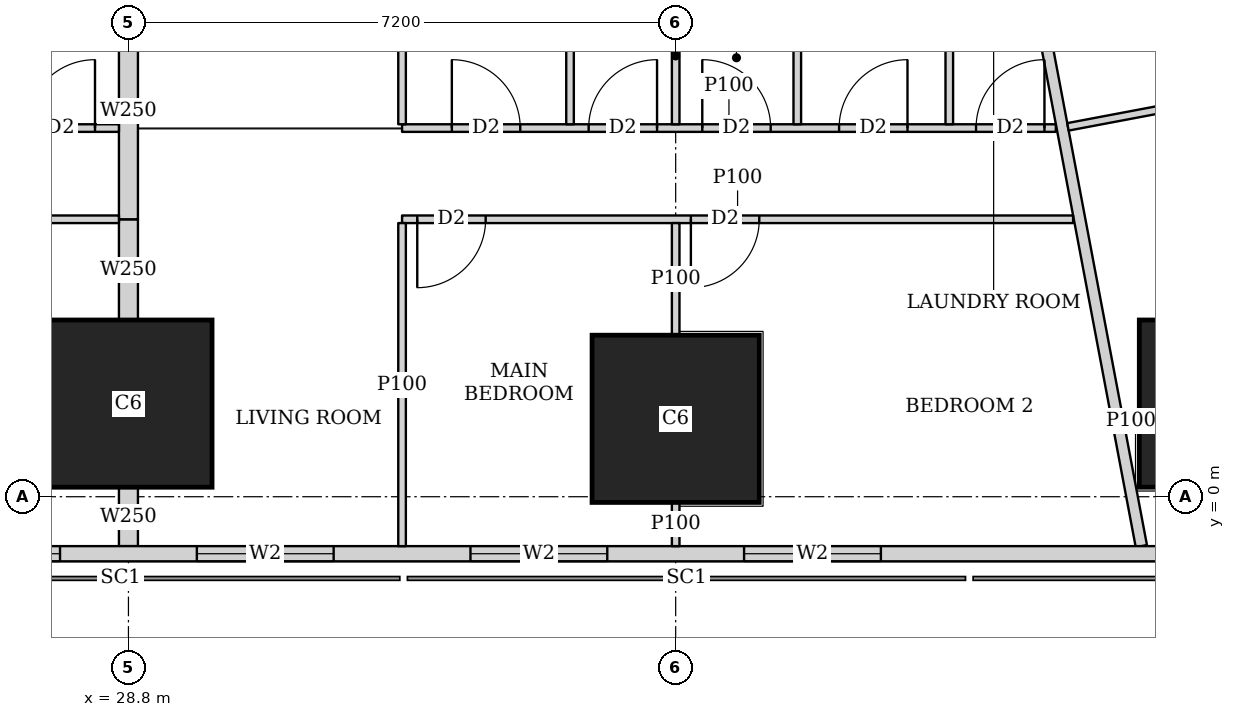
"""IFC4 building model, lengths in metres.
Left out: names, types, materials, properties, quantities, classifications, styles, units other than length and angle.
Written with IfcOpenShell. Run it as: python <this file> out.ifc"""

import sys

from ifc_helpers import new_model, si_unit, direction, frame, frame_2d, origin, origin_2d, place, context, subcontext, project, spatial, rectangle, extrude, element, fill, save


model = new_model("IFC4")
c1 = context("Model", 3, precision=1e-05, world=origin(), true_north=direction((0.0, 1.0)))
c2 = subcontext(c1, "Body", "Model", "MODEL_VIEW")
j1 = project(units=[si_unit("LENGTHUNIT", "METRE"), si_unit("PLANEANGLEUNIT", "RADIAN")], contexts=[c1])
p1 = place(None, origin())
s1 = spatial("IfcSite", under=j1, at=p1, CompositionType="ELEMENT")
p2 = place(p1, origin())
s2 = spatial("IfcBuilding", under=s1, at=p2, CompositionType="ELEMENT")
p3 = place(p2, frame((0.0, 0.0, 77.9)))
s3 = spatial("IfcBuildingStorey", under=s2, at=p3, CompositionType="ELEMENT", Elevation=77.9)
for number, where, z_axis, x_axis in (
    (1, (28.8, 1.225, 0.0), (0.0, 0.0, 1.0), (1.0, 0.0, 0.0)),
    (2, (36.0, 1.025, 0.0), (0.0, 0.0, 1.0), (1.0, 0.0, 0.0)),
    (3, (43.2, 1.225, 0.0), (0.0, 0.0, 1.0), (1.0, 0.0, 0.0)),
):
    element("IfcColumn", number, at=place(p3, frame(where, z_axis=z_axis, x_axis=x_axis)), inside=s3, PredefinedType="COLUMN", context=c2, shape_type="SweptSolid", body=[
        extrude(rectangle(XDim=2.2, YDim=2.2, at=origin_2d()), origin(), (0.0, 0.0, 1.0), 3.75),
    ])
p4 = place(p3, frame((2.163, -0.75, 0.0), z_axis=(0.0, 0.0, 1.0), x_axis=(1.0, 0.0, 0.0)))
e4 = element("IfcWall", 4, at=p4, inside=s3, PredefinedType="SOLIDWALL", context=c2, shape_type="SweptSolid", body=[
    extrude(rectangle(XDim=45.628, YDim=0.2, at=frame_2d((22.814, 0.0))), origin(), (0.0, 0.0, 1.0), 3.5),
])
p5 = place(p4, frame((9.537, 0.0, 0.9)))
e5 = element("IfcOpeningElement", 5, at=p5, cuts=e4, PredefinedType="OPENING", context=c2, shape_type="SweptSolid", body=[
    extrude(rectangle(XDim=1.8, YDim=1.5, at=frame_2d((0.9, 0.75))), frame((0.0, 0.11, 0.0), z_axis=(0.0, -1.0, 0.0), x_axis=(1.0, 0.0, 0.0)), (0.0, 0.0, 1.0), 0.22),
])
p6 = place(p4, frame((13.137, 0.0, 0.9)))
e6 = element("IfcOpeningElement", 6, at=p6, cuts=e4, PredefinedType="OPENING", context=c2, shape_type="SweptSolid", body=[
    extrude(rectangle(XDim=1.8, YDim=1.5, at=frame_2d((0.9, 0.75))), frame((0.0, 0.11, 0.0), z_axis=(0.0, -1.0, 0.0), x_axis=(1.0, 0.0, 0.0)), (0.0, 0.0, 1.0), 0.22),
])
p7 = place(p4, frame((16.737, 0.0, 0.9)))
e7 = element("IfcOpeningElement", 7, at=p7, cuts=e4, PredefinedType="OPENING", context=c2, shape_type="SweptSolid", body=[
    extrude(rectangle(XDim=1.8, YDim=1.5, at=frame_2d((0.9, 0.75))), frame((0.0, 0.11, 0.0), z_axis=(0.0, -1.0, 0.0), x_axis=(1.0, 0.0, 0.0)), (0.0, 0.0, 1.0), 0.22),
])
p8 = place(p4, frame((20.337, 0.0, 0.9)))
e8 = element("IfcOpeningElement", 8, at=p8, cuts=e4, PredefinedType="OPENING", context=c2, shape_type="SweptSolid", body=[
    extrude(rectangle(XDim=1.8, YDim=1.5, at=frame_2d((0.9, 0.75))), frame((0.0, 0.11, 0.0), z_axis=(0.0, -1.0, 0.0), x_axis=(1.0, 0.0, 0.0)), (0.0, 0.0, 1.0), 0.22),
])
p9 = place(p4, frame((23.937, 0.0, 0.9)))
e9 = element("IfcOpeningElement", 9, at=p9, cuts=e4, PredefinedType="OPENING", context=c2, shape_type="SweptSolid", body=[
    extrude(rectangle(XDim=1.8, YDim=1.5, at=frame_2d((0.9, 0.75))), frame((0.0, 0.11, 0.0), z_axis=(0.0, -1.0, 0.0), x_axis=(1.0, 0.0, 0.0)), (0.0, 0.0, 1.0), 0.22),
])
p10 = place(p4, frame((27.537, 0.0, 0.9)))
e10 = element("IfcOpeningElement", 10, at=p10, cuts=e4, PredefinedType="OPENING", context=c2, shape_type="SweptSolid", body=[
    extrude(rectangle(XDim=1.8, YDim=1.5, at=frame_2d((0.9, 0.75))), frame((0.0, 0.11, 0.0), z_axis=(0.0, -1.0, 0.0), x_axis=(1.0, 0.0, 0.0)), (0.0, 0.0, 1.0), 0.22),
])
p11 = place(p4, frame((31.137, 0.0, 0.9)))
e11 = element("IfcOpeningElement", 11, at=p11, cuts=e4, PredefinedType="OPENING", context=c2, shape_type="SweptSolid", body=[
    extrude(rectangle(XDim=1.8, YDim=1.5, at=frame_2d((0.9, 0.75))), frame((0.0, 0.11, 0.0), z_axis=(0.0, -1.0, 0.0), x_axis=(1.0, 0.0, 0.0)), (0.0, 0.0, 1.0), 0.22),
])
p12 = place(p4, frame((34.737, 0.0, 0.9)))
e12 = element("IfcOpeningElement", 12, at=p12, cuts=e4, PredefinedType="OPENING", context=c2, shape_type="SweptSolid", body=[
    extrude(rectangle(XDim=1.8, YDim=1.5, at=frame_2d((0.9, 0.75))), frame((0.0, 0.11, 0.0), z_axis=(0.0, -1.0, 0.0), x_axis=(1.0, 0.0, 0.0)), (0.0, 0.0, 1.0), 0.22),
])
p13 = place(p3, frame((33.382, 45.65, 0.0), z_axis=(0.0, 0.0, 1.0), x_axis=(0.185593544777, -0.982626600565, 0.0)))
e13 = element("IfcWall", 13, at=p13, inside=s3, PredefinedType="SOLIDWALL", context=c2, shape_type="SweptSolid", body=[
    extrude(rectangle(XDim=47.118, YDim=0.15, at=frame_2d((23.559, 0.0))), origin(), (0.0, 0.0, 1.0), 2.2),
])
p14 = place(p13, frame((19.054, 0.0, 0.0)))
e14 = element("IfcOpeningElement", 14, at=p14, cuts=e13, PredefinedType="OPENING", context=c2, shape_type="SweptSolid", body=[
    extrude(rectangle(XDim=1.0, YDim=2.1, at=frame_2d((0.5, 1.05))), frame((0.0, 0.085, 0.0), z_axis=(0.0, -1.0, 0.0), x_axis=(1.0, 0.0, 0.0)), (0.0, 0.0, 1.0), 0.17),
])
p15 = place(p13, frame((22.87, 0.0, 0.0)))
e15 = element("IfcOpeningElement", 15, at=p15, cuts=e13, PredefinedType="OPENING", context=c2, shape_type="SweptSolid", body=[
    extrude(rectangle(XDim=1.0, YDim=2.1, at=frame_2d((0.5, 1.05))), frame((0.0, 0.085, 0.0), z_axis=(0.0, -1.0, 0.0), x_axis=(1.0, 0.0, 0.0)), (0.0, 0.0, 1.0), 0.17),
])
p16 = place(p13, frame((33.833, 0.0, 0.0)))
e16 = element("IfcOpeningElement", 16, at=p16, cuts=e13, PredefinedType="OPENING", context=c2, shape_type="SweptSolid", body=[
    extrude(rectangle(XDim=1.0, YDim=2.1, at=frame_2d((0.5, 1.05))), frame((0.0, 0.085, 0.0), z_axis=(0.0, -1.0, 0.0), x_axis=(1.0, 0.0, 0.0)), (0.0, 0.0, 1.0), 0.17),
])
p17 = place(p3, frame((28.675, 3.65, 0.0), z_axis=(0.0, 0.0, 1.0), x_axis=(-1.0, 0.0, 0.0)))
e17 = element("IfcWall", 17, at=p17, inside=s3, PredefinedType="PARTITIONING", context=c2, shape_type="SweptSolid", body=[
    extrude(rectangle(XDim=10.675, YDim=0.1, at=frame_2d((5.337, 0.0))), origin(), (0.0, 0.0, 1.0), 3.5),
])
p18 = place(p17, frame((9.575, 0.0, 0.0)))
e18 = element("IfcOpeningElement", 18, at=p18, cuts=e17, PredefinedType="OPENING", context=c2, shape_type="SweptSolid", body=[
    extrude(rectangle(XDim=0.9, YDim=2.1, at=frame_2d((0.45, 1.05))), frame((0.0, 0.06, 0.0), z_axis=(0.0, -1.0, 0.0), x_axis=(1.0, 0.0, 0.0)), (0.0, 0.0, 1.0), 0.12),
])
p19 = place(p17, frame((5.975, 0.0, 0.0)))
e19 = element("IfcOpeningElement", 19, at=p19, cuts=e17, PredefinedType="OPENING", context=c2, shape_type="SweptSolid", body=[
    extrude(rectangle(XDim=0.9, YDim=2.1, at=frame_2d((0.45, 1.05))), frame((0.0, 0.06, 0.0), z_axis=(0.0, -1.0, 0.0), x_axis=(1.0, 0.0, 0.0)), (0.0, 0.0, 1.0), 0.12),
])
p20 = place(p17, frame((2.375, 0.0, 0.0)))
e20 = element("IfcOpeningElement", 20, at=p20, cuts=e17, PredefinedType="OPENING", context=c2, shape_type="SweptSolid", body=[
    extrude(rectangle(XDim=0.9, YDim=2.1, at=frame_2d((0.45, 1.05))), frame((0.0, 0.06, 0.0), z_axis=(0.0, -1.0, 0.0), x_axis=(1.0, 0.0, 0.0)), (0.0, 0.0, 1.0), 0.12),
])
p21 = place(p3, frame((28.675, 4.85, 0.0), z_axis=(0.0, 0.0, 1.0), x_axis=(-1.0, 0.0, 0.0)))
e21 = element("IfcWall", 21, at=p21, inside=s3, PredefinedType="PARTITIONING", context=c2, shape_type="SweptSolid", body=[
    extrude(rectangle(XDim=10.675, YDim=0.1, at=frame_2d((5.337, 0.0))), origin(), (0.0, 0.0, 1.0), 3.5),
])
p22 = place(p21, frame((9.12, 0.0, 0.0)))
e22 = element("IfcOpeningElement", 22, at=p22, cuts=e21, PredefinedType="OPENING", context=c2, shape_type="SweptSolid", body=[
    extrude(rectangle(XDim=0.9, YDim=2.1, at=frame_2d((0.45, 1.05))), frame((0.0, 0.06, 0.0), z_axis=(0.0, -1.0, 0.0), x_axis=(1.0, 0.0, 0.0)), (0.0, 0.0, 1.0), 0.12),
])
p23 = place(p21, frame((5.825, 0.0, 0.0)))
e23 = element("IfcOpeningElement", 23, at=p23, cuts=e21, PredefinedType="OPENING", context=c2, shape_type="SweptSolid", body=[
    extrude(rectangle(XDim=0.9, YDim=2.1, at=frame_2d((0.45, 1.05))), frame((0.0, 0.06, 0.0), z_axis=(0.0, -1.0, 0.0), x_axis=(1.0, 0.0, 0.0)), (0.0, 0.0, 1.0), 0.12),
])
p24 = place(p21, frame((2.115, 0.0, 0.0)))
e24 = element("IfcOpeningElement", 24, at=p24, cuts=e21, PredefinedType="OPENING", context=c2, shape_type="SweptSolid", body=[
    extrude(rectangle(XDim=0.9, YDim=2.1, at=frame_2d((0.45, 1.05))), frame((0.0, 0.06, 0.0), z_axis=(0.0, -1.0, 0.0), x_axis=(1.0, 0.0, 0.0)), (0.0, 0.0, 1.0), 0.12),
])
p25 = place(p21, frame((7.32, 0.0, 0.0)))
e25 = element("IfcOpeningElement", 25, at=p25, cuts=e21, PredefinedType="OPENING", context=c2, shape_type="SweptSolid", body=[
    extrude(rectangle(XDim=0.9, YDim=2.1, at=frame_2d((0.45, 1.05))), frame((0.0, 0.06, 0.0), z_axis=(0.0, -1.0, 0.0), x_axis=(1.0, 0.0, 0.0)), (0.0, 0.0, 1.0), 0.12),
])
p26 = place(p21, frame((4.025, 0.0, 0.0)))
e26 = element("IfcOpeningElement", 26, at=p26, cuts=e21, PredefinedType="OPENING", context=c2, shape_type="SweptSolid", body=[
    extrude(rectangle(XDim=0.9, YDim=2.1, at=frame_2d((0.45, 1.05))), frame((0.0, 0.06, 0.0), z_axis=(0.0, -1.0, 0.0), x_axis=(1.0, 0.0, 0.0)), (0.0, 0.0, 1.0), 0.12),
])
p27 = place(p21, frame((0.315, 0.0, 0.0)))
e27 = element("IfcOpeningElement", 27, at=p27, cuts=e21, PredefinedType="OPENING", context=c2, shape_type="SweptSolid", body=[
    extrude(rectangle(XDim=0.9, YDim=2.1, at=frame_2d((0.45, 1.05))), frame((0.0, 0.06, 0.0), z_axis=(0.0, -1.0, 0.0), x_axis=(1.0, 0.0, 0.0)), (0.0, 0.0, 1.0), 0.12),
])
p28 = place(p3, frame((41.229, 3.65, 0.0), z_axis=(0.0, 0.0, 1.0), x_axis=(-1.0, 0.0, 0.0)))
e28 = element("IfcWall", 28, at=p28, inside=s3, PredefinedType="PARTITIONING", context=c2, shape_type="SweptSolid", body=[
    extrude(rectangle(XDim=8.829, YDim=0.1, at=frame_2d((4.415, 0.0))), origin(), (0.0, 0.0, 1.0), 3.5),
])
p29 = place(p28, frame((7.729, 0.0, 0.0)))
e29 = element("IfcOpeningElement", 29, at=p29, cuts=e28, PredefinedType="OPENING", context=c2, shape_type="SweptSolid", body=[
    extrude(rectangle(XDim=0.9, YDim=2.1, at=frame_2d((0.45, 1.05))), frame((0.0, 0.06, 0.0), z_axis=(0.0, -1.0, 0.0), x_axis=(1.0, 0.0, 0.0)), (0.0, 0.0, 1.0), 0.12),
])
p30 = place(p28, frame((4.129, 0.0, 0.0)))
e30 = element("IfcOpeningElement", 30, at=p30, cuts=e28, PredefinedType="OPENING", context=c2, shape_type="SweptSolid", body=[
    extrude(rectangle(XDim=0.9, YDim=2.1, at=frame_2d((0.45, 1.05))), frame((0.0, 0.06, 0.0), z_axis=(0.0, -1.0, 0.0), x_axis=(1.0, 0.0, 0.0)), (0.0, 0.0, 1.0), 0.12),
])
p31 = place(p3, frame((41.002, 4.85, 0.0), z_axis=(0.0, 0.0, 1.0), x_axis=(-1.0, 0.0, 0.0)))
e31 = element("IfcWall", 31, at=p31, inside=s3, PredefinedType="PARTITIONING", context=c2, shape_type="SweptSolid", body=[
    extrude(rectangle(XDim=8.602, YDim=0.1, at=frame_2d((4.301, 0.0))), origin(), (0.0, 0.0, 1.0), 3.5),
])
p32 = place(p31, frame((7.047, 0.0, 0.0)))
e32 = element("IfcOpeningElement", 32, at=p32, cuts=e31, PredefinedType="OPENING", context=c2, shape_type="SweptSolid", body=[
    extrude(rectangle(XDim=0.9, YDim=2.1, at=frame_2d((0.45, 1.05))), frame((0.0, 0.06, 0.0), z_axis=(0.0, -1.0, 0.0), x_axis=(1.0, 0.0, 0.0)), (0.0, 0.0, 1.0), 0.12),
])
p33 = place(p31, frame((3.752, 0.0, 0.0)))
e33 = element("IfcOpeningElement", 33, at=p33, cuts=e31, PredefinedType="OPENING", context=c2, shape_type="SweptSolid", body=[
    extrude(rectangle(XDim=0.9, YDim=2.1, at=frame_2d((0.45, 1.05))), frame((0.0, 0.06, 0.0), z_axis=(0.0, -1.0, 0.0), x_axis=(1.0, 0.0, 0.0)), (0.0, 0.0, 1.0), 0.12),
])
p34 = place(p31, frame((0.15, 0.0, 0.0)))
e34 = element("IfcOpeningElement", 34, at=p34, cuts=e31, PredefinedType="OPENING", context=c2, shape_type="SweptSolid", body=[
    extrude(rectangle(XDim=0.9, YDim=2.1, at=frame_2d((0.45, 1.05))), frame((0.0, 0.06, 0.0), z_axis=(0.0, -1.0, 0.0), x_axis=(1.0, 0.0, 0.0)), (0.0, 0.0, 1.0), 0.12),
])
p35 = place(p31, frame((5.247, 0.0, 0.0)))
e35 = element("IfcOpeningElement", 35, at=p35, cuts=e31, PredefinedType="OPENING", context=c2, shape_type="SweptSolid", body=[
    extrude(rectangle(XDim=0.9, YDim=2.1, at=frame_2d((0.45, 1.05))), frame((0.0, 0.06, 0.0), z_axis=(0.0, -1.0, 0.0), x_axis=(1.0, 0.0, 0.0)), (0.0, 0.0, 1.0), 0.12),
])
p36 = place(p31, frame((1.952, 0.0, 0.0)))
e36 = element("IfcOpeningElement", 36, at=p36, cuts=e31, PredefinedType="OPENING", context=c2, shape_type="SweptSolid", body=[
    extrude(rectangle(XDim=0.9, YDim=2.1, at=frame_2d((0.45, 1.05))), frame((0.0, 0.06, 0.0), z_axis=(0.0, -1.0, 0.0), x_axis=(1.0, 0.0, 0.0)), (0.0, 0.0, 1.0), 0.12),
])
p37 = place(p3, frame((32.4, -0.65, 0.0), z_axis=(0.0, 0.0, 1.0), x_axis=(0.0, 1.0, 0.0)))
e37 = element("IfcWall", 37, at=p37, inside=s3, PredefinedType="PARTITIONING", context=c2, shape_type="SweptSolid", body=[
    extrude(rectangle(XDim=4.25, YDim=0.1, at=frame_2d((2.125, 0.0))), origin(), (0.0, 0.0, 1.0), 2.2),
])
p38 = place(p3, frame((36.0, -0.65, 0.0), z_axis=(0.0, 0.0, 1.0), x_axis=(0.0, 1.0, 0.0)))
e38 = element("IfcWall", 38, at=p38, inside=s3, PredefinedType="PARTITIONING", context=c2, shape_type="SweptSolid", body=[
    extrude(rectangle(XDim=0.574, YDim=0.1, at=frame_2d((0.287, 0.0))), origin(), (0.0, 0.0, 1.0), 3.5),
])
p39 = place(p3, frame((36.0, 2.126, 0.0), z_axis=(0.0, 0.0, 1.0), x_axis=(0.0, 1.0, 0.0)))
e39 = element("IfcWall", 39, at=p39, inside=s3, PredefinedType="PARTITIONING", context=c2, shape_type="SweptSolid", body=[
    extrude(rectangle(XDim=1.474, YDim=0.1, at=frame_2d((0.737, 0.0))), origin(), (0.0, 0.0, 1.0), 3.5),
])
p40 = place(p3, frame((32.4, 4.9, 0.0), z_axis=(0.0, 0.0, 1.0), x_axis=(0.0, 1.0, 0.0)))
e40 = element("IfcWall", 40, at=p40, inside=s3, PredefinedType="PARTITIONING", context=c2, shape_type="SweptSolid", body=[
    extrude(rectangle(XDim=3.275, YDim=0.1, at=frame_2d((1.638, 0.0))), origin(), (0.0, 0.0, 1.0), 3.5),
])
p41 = place(p3, frame((36.0, 4.9, 0.0), z_axis=(0.0, 0.0, 1.0), x_axis=(0.0, 1.0, 0.0)))
e41 = element("IfcWall", 41, at=p41, inside=s3, PredefinedType="PARTITIONING", context=c2, shape_type="SweptSolid", body=[
    extrude(rectangle(XDim=1.799, YDim=0.1, at=frame_2d((0.899, 0.0))), origin(), (0.0, 0.0, 1.0), 3.5),
])
for number, where, z_axis, x_axis in (
    (42, (39.6, 4.9, 0.0), (0.0, 0.0, 1.0), (0.0, 1.0, 0.0)),
    (43, (34.61, 4.9, 0.0), (0.0, 0.0, 1.0), (0.0, 1.0, 0.0)),
    (44, (37.6, 4.9, 0.0), (0.0, 0.0, 1.0), (0.0, 1.0, 0.0)),
):
    element("IfcWall", number, at=place(p3, frame(where, z_axis=z_axis, x_axis=x_axis)), inside=s3, PredefinedType="PARTITIONING", context=c2, shape_type="SweptSolid", body=[
        extrude(rectangle(XDim=3.275, YDim=0.1, at=frame_2d((1.638, 0.0))), origin(), (0.0, 0.0, 1.0), 3.5),
    ])
p42 = place(p3, frame((28.8, -0.65, 0.0), z_axis=(0.0, 0.0, 1.0), x_axis=(0.0, 1.0, 0.0)))
e45 = element("IfcWall", 45, at=p42, inside=s3, PredefinedType="SOLIDWALL", context=c2, shape_type="SweptSolid", body=[
    extrude(rectangle(XDim=0.774, YDim=0.25, at=frame_2d((0.387, 0.0))), origin(), (0.0, 0.0, 1.0), 3.5),
])
p43 = place(p3, frame((28.8, 2.326, 0.0), z_axis=(0.0, 0.0, 1.0), x_axis=(0.0, 1.0, 0.0)))
e46 = element("IfcWall", 46, at=p43, inside=s3, PredefinedType="SOLIDWALL", context=c2, shape_type="SweptSolid", body=[
    extrude(rectangle(XDim=1.324, YDim=0.25, at=frame_2d((0.662, 0.0))), origin(), (0.0, 0.0, 1.0), 3.5),
])
p44 = place(p3, frame((28.8, 3.65, 0.0), z_axis=(0.0, 0.0, 1.0), x_axis=(0.0, 1.0, 0.0)))
e47 = element("IfcWall", 47, at=p44, inside=s3, PredefinedType="SOLIDWALL", context=c2, shape_type="SweptSolid", body=[
    extrude(rectangle(XDim=2.849, YDim=0.25, at=frame_2d((1.425, 0.0))), origin(), (0.0, 0.0, 1.0), 3.5),
])
p45 = place(p3, frame((42.09, 1.016, 0.0), z_axis=(0.0, 0.0, 1.0), x_axis=(-0.982208563973, -0.187793335502, 0.0)))
e48 = element("IfcWall", 48, at=p45, inside=s3, PredefinedType="PARTITIONING", context=c2, shape_type="SweptSolid", body=[
    extrude(rectangle(XDim=0.198, YDim=0.1, at=frame_2d((0.099, 0.0))), origin(), (0.0, 0.0, 1.0), 2.05),
])
p46 = place(p3, frame((44.379, 5.474, 0.0), z_axis=(0.0, 0.0, 1.0), x_axis=(-0.982607026909, -0.185697147715, 0.0)))
e49 = element("IfcWall", 49, at=p46, inside=s3, PredefinedType="PARTITIONING", context=c2, shape_type="SweptSolid", body=[
    extrude(rectangle(XDim=3.275, YDim=0.1, at=frame_2d((1.637, 0.0))), origin(), (0.0, 0.0, 1.0), 3.5),
])
p47 = place(p9, origin())
e50 = element("IfcWindow", 50, at=p47, inside=s3, PartitioningType="SINGLE_PANEL", PredefinedType="WINDOW", context=c2, shape_type="SweptSolid", body=[
    extrude(rectangle(XDim=1.8, YDim=1.5, at=frame_2d((0.9, 0.75))), frame((0.0, 0.03, 0.0), z_axis=(0.0, -1.0, 0.0), x_axis=(1.0, 0.0, 0.0)), (0.0, 0.0, 1.0), 0.06),
])
fill(e9, e50)
p48 = place(p10, origin())
e51 = element("IfcWindow", 51, at=p48, inside=s3, PartitioningType="SINGLE_PANEL", PredefinedType="WINDOW", context=c2, shape_type="SweptSolid", body=[
    extrude(rectangle(XDim=1.8, YDim=1.5, at=frame_2d((0.9, 0.75))), frame((0.0, 0.03, 0.0), z_axis=(0.0, -1.0, 0.0), x_axis=(1.0, 0.0, 0.0)), (0.0, 0.0, 1.0), 0.06),
])
fill(e10, e51)
p49 = place(p11, origin())
e52 = element("IfcWindow", 52, at=p49, inside=s3, PartitioningType="SINGLE_PANEL", PredefinedType="WINDOW", context=c2, shape_type="SweptSolid", body=[
    extrude(rectangle(XDim=1.8, YDim=1.5, at=frame_2d((0.9, 0.75))), frame((0.0, 0.03, 0.0), z_axis=(0.0, -1.0, 0.0), x_axis=(1.0, 0.0, 0.0)), (0.0, 0.0, 1.0), 0.06),
])
fill(e11, e52)
p50 = place(p12, origin())
e53 = element("IfcWindow", 53, at=p50, inside=s3, PartitioningType="SINGLE_PANEL", PredefinedType="WINDOW", context=c2, shape_type="SweptSolid", body=[
    extrude(rectangle(XDim=1.8, YDim=1.5, at=frame_2d((0.9, 0.75))), frame((0.0, 0.03, 0.0), z_axis=(0.0, -1.0, 0.0), x_axis=(1.0, 0.0, 0.0)), (0.0, 0.0, 1.0), 0.06),
])
fill(e12, e53)
p51 = place(p27, origin())
e54 = element("IfcDoor", 54, at=p51, inside=s3, OperationType="SINGLE_SWING_RIGHT", PredefinedType="DOOR", context=c2, shape_type="SweptSolid", body=[
    extrude(rectangle(XDim=0.9, YDim=2.1, at=frame_2d((0.45, 1.05))), frame((0.0, 0.025, 0.0), z_axis=(0.0, -1.0, 0.0), x_axis=(1.0, 0.0, 0.0)), (0.0, 0.0, 1.0), 0.05),
])
fill(e27, e54)
p52 = place(p29, origin())
e55 = element("IfcDoor", 55, at=p52, inside=s3, OperationType="SINGLE_SWING_RIGHT", PredefinedType="DOOR", context=c2, shape_type="SweptSolid", body=[
    extrude(rectangle(XDim=0.9, YDim=2.1, at=frame_2d((0.45, 1.05))), frame((0.0, 0.025, 0.0), z_axis=(0.0, -1.0, 0.0), x_axis=(1.0, 0.0, 0.0)), (0.0, 0.0, 1.0), 0.05),
])
fill(e29, e55)
p53 = place(p30, origin())
e56 = element("IfcDoor", 56, at=p53, inside=s3, OperationType="SINGLE_SWING_RIGHT", PredefinedType="DOOR", context=c2, shape_type="SweptSolid", body=[
    extrude(rectangle(XDim=0.9, YDim=2.1, at=frame_2d((0.45, 1.05))), frame((0.0, 0.025, 0.0), z_axis=(0.0, -1.0, 0.0), x_axis=(1.0, 0.0, 0.0)), (0.0, 0.0, 1.0), 0.05),
])
fill(e30, e56)
p54 = place(p32, origin())
e57 = element("IfcDoor", 57, at=p54, inside=s3, OperationType="SINGLE_SWING_LEFT", PredefinedType="DOOR", context=c2, shape_type="SweptSolid", body=[
    extrude(rectangle(XDim=0.9, YDim=2.1, at=frame_2d((0.45, 1.05))), frame((0.0, 0.025, 0.0), z_axis=(0.0, -1.0, 0.0), x_axis=(1.0, 0.0, 0.0)), (0.0, 0.0, 1.0), 0.05),
])
fill(e32, e57)
p55 = place(p33, origin())
e58 = element("IfcDoor", 58, at=p55, inside=s3, OperationType="SINGLE_SWING_LEFT", PredefinedType="DOOR", context=c2, shape_type="SweptSolid", body=[
    extrude(rectangle(XDim=0.9, YDim=2.1, at=frame_2d((0.45, 1.05))), frame((0.0, 0.025, 0.0), z_axis=(0.0, -1.0, 0.0), x_axis=(1.0, 0.0, 0.0)), (0.0, 0.0, 1.0), 0.05),
])
fill(e33, e58)
p56 = place(p34, origin())
e59 = element("IfcDoor", 59, at=p56, inside=s3, OperationType="SINGLE_SWING_RIGHT", PredefinedType="DOOR", context=c2, shape_type="SweptSolid", body=[
    extrude(rectangle(XDim=0.9, YDim=2.1, at=frame_2d((0.45, 1.05))), frame((0.0, 0.025, 0.0), z_axis=(0.0, -1.0, 0.0), x_axis=(1.0, 0.0, 0.0)), (0.0, 0.0, 1.0), 0.05),
])
fill(e34, e59)
p57 = place(p35, origin())
e60 = element("IfcDoor", 60, at=p57, inside=s3, OperationType="SINGLE_SWING_RIGHT", PredefinedType="DOOR", context=c2, shape_type="SweptSolid", body=[
    extrude(rectangle(XDim=0.9, YDim=2.1, at=frame_2d((0.45, 1.05))), frame((0.0, 0.025, 0.0), z_axis=(0.0, -1.0, 0.0), x_axis=(1.0, 0.0, 0.0)), (0.0, 0.0, 1.0), 0.05),
])
fill(e35, e60)
p58 = place(p36, origin())
e61 = element("IfcDoor", 61, at=p58, inside=s3, OperationType="SINGLE_SWING_RIGHT", PredefinedType="DOOR", context=c2, shape_type="SweptSolid", body=[
    extrude(rectangle(XDim=0.9, YDim=2.1, at=frame_2d((0.45, 1.05))), frame((0.0, 0.025, 0.0), z_axis=(0.0, -1.0, 0.0), x_axis=(1.0, 0.0, 0.0)), (0.0, 0.0, 1.0), 0.05),
])
fill(e36, e61)
save(model, sys.argv[1])
